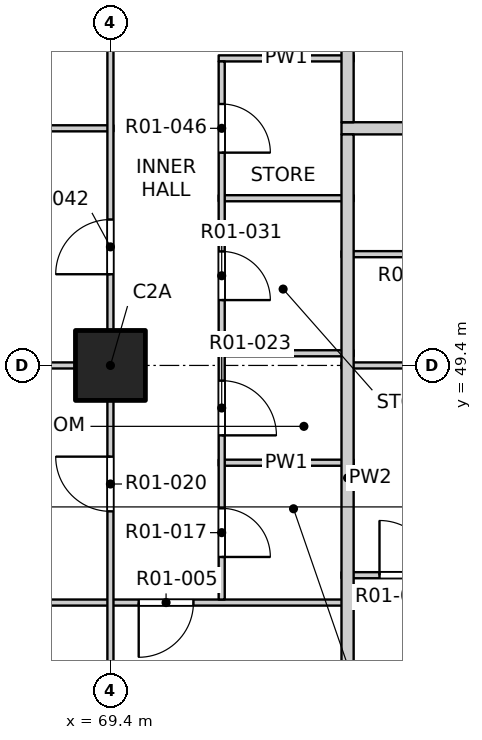
"""IFC4 building model, lengths in metres.
Left out: names, types, materials, properties, quantities, classifications, styles, units other than length and angle.
Written with IfcOpenShell. Run it as: python <this file> out.ifc"""

import sys

from ifc_helpers import new_model, si_unit, direction, frame, frame_2d, origin, origin_2d, place, context, subcontext, project, spatial, rectangle, extrude, element, fill, save


model = new_model("IFC4")
c1 = context("Model", 3, precision=1e-05, world=origin(), true_north=direction((0.0, 1.0)))
c2 = subcontext(c1, "Body", "Model", "MODEL_VIEW")
j1 = project(units=[si_unit("LENGTHUNIT", "METRE"), si_unit("PLANEANGLEUNIT", "RADIAN")], contexts=[c1])
p1 = place(None, origin())
s1 = spatial("IfcSite", under=j1, at=p1, CompositionType="ELEMENT")
p2 = place(p1, origin())
s2 = spatial("IfcBuilding", under=s1, at=p2, CompositionType="ELEMENT")
p3 = place(p2, frame((0.0, 0.0, 19.5)))
s3 = spatial("IfcBuildingStorey", under=s2, at=p3, CompositionType="ELEMENT", Elevation=19.5)
p4 = place(p3, frame((69.4, 49.4, -0.25), z_axis=(0.0, 0.0, 1.0), x_axis=(1.0, 0.0, 0.0)))
e1 = element("IfcColumn", 1, at=p4, inside=s3, PredefinedType="COLUMN", context=c2, shape_type="SweptSolid", body=[
    extrude(rectangle(XDim=1.15, YDim=1.15, at=origin_2d()), origin(), (0.0, 0.0, 1.0), 3.4),
])
p5 = place(p3, frame((61.9, 45.5, 0.0), z_axis=(0.0, 0.0, 1.0), x_axis=(1.0, 0.0, 0.0)))
e2 = element("IfcWall", 2, at=p5, inside=s3, PredefinedType="PARTITIONING", context=c2, shape_type="SweptSolid", body=[
    extrude(rectangle(XDim=11.5, YDim=0.1, at=frame_2d((5.75, 0.0))), origin(), (0.0, 0.0, 1.0), 3.15),
])
p6 = place(p5, frame((7.965, 0.0, 0.0)))
e3 = element("IfcOpeningElement", 3, at=p6, cuts=e2, PredefinedType="OPENING", context=c2, shape_type="SweptSolid", body=[
    extrude(rectangle(XDim=0.9, YDim=2.1, at=frame_2d((0.45, 1.05))), frame((0.0, 0.06, 0.0), z_axis=(0.0, -1.0, 0.0), x_axis=(1.0, 0.0, 0.0)), (0.0, 0.0, 1.0), 0.12),
])
p7 = place(p3, frame((73.2, 45.95, 0.0), z_axis=(0.0, 0.0, 1.0), x_axis=(1.0, 0.0, 0.0)))
e4 = element("IfcWall", 4, at=p7, inside=s3, PredefinedType="PARTITIONING", context=c2, shape_type="SweptSolid", body=[
    extrude(rectangle(XDim=15.8, YDim=0.1, at=frame_2d((7.9, 0.0))), origin(), (0.0, 0.0, 1.0), 3.15),
])
p8 = place(p7, frame((0.625, 0.0, 0.0)))
e5 = element("IfcOpeningElement", 5, at=p8, cuts=e4, PredefinedType="OPENING", context=c2, shape_type="SweptSolid", body=[
    extrude(rectangle(XDim=0.9, YDim=2.1, at=frame_2d((0.45, 1.05))), frame((0.0, 0.06, 0.0), z_axis=(0.0, -1.0, 0.0), x_axis=(1.0, 0.0, 0.0)), (0.0, 0.0, 1.0), 0.12),
])
p9 = place(p7, frame((2.575, 0.0, 0.0)))
e6 = element("IfcOpeningElement", 6, at=p9, cuts=e4, PredefinedType="OPENING", context=c2, shape_type="SweptSolid", body=[
    extrude(rectangle(XDim=0.9, YDim=2.1, at=frame_2d((0.45, 1.05))), frame((0.0, 0.06, 0.0), z_axis=(0.0, -1.0, 0.0), x_axis=(1.0, 0.0, 0.0)), (0.0, 0.0, 1.0), 0.12),
])
p10 = place(p7, frame((5.35, 0.0, 0.0)))
e7 = element("IfcOpeningElement", 7, at=p10, cuts=e4, PredefinedType="OPENING", context=c2, shape_type="SweptSolid", body=[
    extrude(rectangle(XDim=1.2, YDim=2.1, at=frame_2d((0.6, 1.05))), frame((0.0, 0.06, 0.0), z_axis=(0.0, -1.0, 0.0), x_axis=(1.0, 0.0, 0.0)), (0.0, 0.0, 1.0), 0.12),
])
p11 = place(p7, frame((9.25, 0.0, 0.0)))
e8 = element("IfcOpeningElement", 8, at=p11, cuts=e4, PredefinedType="OPENING", context=c2, shape_type="SweptSolid", body=[
    extrude(rectangle(XDim=1.2, YDim=2.1, at=frame_2d((0.6, 1.05))), frame((0.0, 0.06, 0.0), z_axis=(0.0, -1.0, 0.0), x_axis=(1.0, 0.0, 0.0)), (0.0, 0.0, 1.0), 0.12),
])
p12 = place(p7, frame((12.325, 0.0, 0.0)))
e9 = element("IfcOpeningElement", 9, at=p12, cuts=e4, PredefinedType="OPENING", context=c2, shape_type="SweptSolid", body=[
    extrude(rectangle(XDim=0.9, YDim=2.1, at=frame_2d((0.45, 1.05))), frame((0.0, 0.06, 0.0), z_axis=(0.0, -1.0, 0.0), x_axis=(1.0, 0.0, 0.0)), (0.0, 0.0, 1.0), 0.12),
])
p13 = place(p7, frame((14.275, 0.0, 0.0)))
e10 = element("IfcOpeningElement", 10, at=p13, cuts=e4, PredefinedType="OPENING", context=c2, shape_type="SweptSolid", body=[
    extrude(rectangle(XDim=0.9, YDim=2.1, at=frame_2d((0.45, 1.05))), frame((0.0, 0.06, 0.0), z_axis=(0.0, -1.0, 0.0), x_axis=(1.0, 0.0, 0.0)), (0.0, 0.0, 1.0), 0.12),
])
p14 = place(p3, frame((71.18, 47.8, 0.0), z_axis=(0.0, 0.0, 1.0), x_axis=(1.0, 0.0, 0.0)))
e11 = element("IfcWall", 11, at=p14, inside=s3, PredefinedType="PARTITIONING", context=c2, shape_type="SweptSolid", body=[
    extrude(rectangle(XDim=2.22, YDim=0.1, at=frame_2d((1.11, 0.0))), origin(), (0.0, 0.0, 1.0), 3.15),
])
p15 = place(p3, frame((61.9, 49.4, 0.0), z_axis=(0.0, 0.0, 1.0), x_axis=(1.0, 0.0, 0.0)))
e12 = element("IfcWall", 12, at=p15, inside=s3, PredefinedType="PARTITIONING", context=c2, shape_type="SweptSolid", body=[
    extrude(rectangle(XDim=7.55, YDim=0.1, at=frame_2d((3.775, 0.0))), origin(), (0.0, 0.0, 1.0), 2.55),
])
p16 = place(p3, frame((73.2, 49.4, 0.0), z_axis=(0.0, 0.0, 1.0), x_axis=(1.0, 0.0, 0.0)))
e13 = element("IfcWall", 13, at=p16, inside=s3, PredefinedType="PARTITIONING", context=c2, shape_type="SweptSolid", body=[
    extrude(rectangle(XDim=23.6, YDim=0.1, at=frame_2d((11.8, 0.0))), origin(), (0.0, 0.0, 1.0), 3.15),
])
p17 = place(p16, frame((2.425, 0.0, 0.0)))
e14 = element("IfcOpeningElement", 14, at=p17, cuts=e13, PredefinedType="OPENING", context=c2, shape_type="SweptSolid", body=[
    extrude(rectangle(XDim=0.9, YDim=2.1, at=frame_2d((0.45, 1.05))), frame((0.0, 0.06, 0.0), z_axis=(0.0, -1.0, 0.0), x_axis=(1.0, 0.0, 0.0)), (0.0, 0.0, 1.0), 0.12),
])
p18 = place(p16, frame((5.5, 0.0, 0.0)))
e15 = element("IfcOpeningElement", 15, at=p18, cuts=e13, PredefinedType="OPENING", context=c2, shape_type="SweptSolid", body=[
    extrude(rectangle(XDim=0.9, YDim=2.1, at=frame_2d((0.45, 1.05))), frame((0.0, 0.06, 0.0), z_axis=(0.0, -1.0, 0.0), x_axis=(1.0, 0.0, 0.0)), (0.0, 0.0, 1.0), 0.12),
])
p19 = place(p16, frame((9.4, 0.0, 0.0)))
e16 = element("IfcOpeningElement", 16, at=p19, cuts=e13, PredefinedType="OPENING", context=c2, shape_type="SweptSolid", body=[
    extrude(rectangle(XDim=0.9, YDim=2.1, at=frame_2d((0.45, 1.05))), frame((0.0, 0.06, 0.0), z_axis=(0.0, -1.0, 0.0), x_axis=(1.0, 0.0, 0.0)), (0.0, 0.0, 1.0), 0.12),
])
p20 = place(p16, frame((14.275, 0.0, 0.0)))
e17 = element("IfcOpeningElement", 17, at=p20, cuts=e13, PredefinedType="OPENING", context=c2, shape_type="SweptSolid", body=[
    extrude(rectangle(XDim=0.9, YDim=2.1, at=frame_2d((0.45, 1.05))), frame((0.0, 0.06, 0.0), z_axis=(0.0, -1.0, 0.0), x_axis=(1.0, 0.0, 0.0)), (0.0, 0.0, 1.0), 0.12),
])
p21 = place(p16, frame((17.2, 0.0, 0.0)))
e18 = element("IfcOpeningElement", 18, at=p21, cuts=e13, PredefinedType="OPENING", context=c2, shape_type="SweptSolid", body=[
    extrude(rectangle(XDim=0.9, YDim=2.1, at=frame_2d((0.45, 1.05))), frame((0.0, 0.06, 0.0), z_axis=(0.0, -1.0, 0.0), x_axis=(1.0, 0.0, 0.0)), (0.0, 0.0, 1.0), 0.12),
])
p22 = place(p16, frame((22.075, 0.0, 0.0)))
e19 = element("IfcOpeningElement", 19, at=p22, cuts=e13, PredefinedType="OPENING", context=c2, shape_type="SweptSolid", body=[
    extrude(rectangle(XDim=0.9, YDim=2.1, at=frame_2d((0.45, 1.05))), frame((0.0, 0.06, 0.0), z_axis=(0.0, -1.0, 0.0), x_axis=(1.0, 0.0, 0.0)), (0.0, 0.0, 1.0), 0.12),
])
p23 = place(p3, frame((71.18, 49.6, 0.0), z_axis=(0.0, 0.0, 1.0), x_axis=(1.0, 0.0, 0.0)))
e20 = element("IfcWall", 20, at=p23, inside=s3, PredefinedType="PARTITIONING", context=c2, shape_type="SweptSolid", body=[
    extrude(rectangle(XDim=2.22, YDim=0.1, at=frame_2d((1.11, 0.0))), origin(), (0.0, 0.0, 1.0), 3.15),
])
p24 = place(p3, frame((73.2, 51.23, 0.0), z_axis=(0.0, 0.0, 1.0), x_axis=(1.0, 0.0, 0.0)))
e21 = element("IfcWall", 21, at=p24, inside=s3, PredefinedType="PARTITIONING", context=c2, shape_type="SweptSolid", body=[
    extrude(rectangle(XDim=5.3, YDim=0.1, at=frame_2d((2.65, 0.0))), origin(), (0.0, 0.0, 1.0), 3.15),
])
p25 = place(p24, frame((1.05, 0.0, 0.0)))
e22 = element("IfcOpeningElement", 22, at=p25, cuts=e21, PredefinedType="OPENING", context=c2, shape_type="SweptSolid", body=[
    extrude(rectangle(XDim=0.8, YDim=2.1, at=frame_2d((0.4, 1.05))), frame((0.0, 0.06, 0.0), z_axis=(0.0, -1.0, 0.0), x_axis=(1.0, 0.0, 0.0)), (0.0, 0.0, 1.0), 0.12),
])
p26 = place(p24, frame((3.625, 0.0, 0.0)))
e23 = element("IfcOpeningElement", 23, at=p26, cuts=e21, PredefinedType="OPENING", context=c2, shape_type="SweptSolid", body=[
    extrude(rectangle(XDim=0.8, YDim=2.1, at=frame_2d((0.4, 1.05))), frame((0.0, 0.06, 0.0), z_axis=(0.0, -1.0, 0.0), x_axis=(1.0, 0.0, 0.0)), (0.0, 0.0, 1.0), 0.12),
])
p27 = place(p3, frame((71.18, 52.15, 0.0), z_axis=(0.0, 0.0, 1.0), x_axis=(1.0, 0.0, 0.0)))
e24 = element("IfcWall", 24, at=p27, inside=s3, PredefinedType="PARTITIONING", context=c2, shape_type="SweptSolid", body=[
    extrude(rectangle(XDim=2.22, YDim=0.1, at=frame_2d((1.11, 0.0))), origin(), (0.0, 0.0, 1.0), 3.15),
])
p28 = place(p3, frame((61.9, 53.3, 0.0), z_axis=(0.0, 0.0, 1.0), x_axis=(1.0, 0.0, 0.0)))
e25 = element("IfcWall", 25, at=p28, inside=s3, PredefinedType="PARTITIONING", context=c2, shape_type="SweptSolid", body=[
    extrude(rectangle(XDim=7.55, YDim=0.1, at=frame_2d((3.775, 0.0))), origin(), (0.0, 0.0, 1.0), 3.15),
])
p29 = place(p3, frame((73.2, 53.3, 0.0), z_axis=(0.0, 0.0, 1.0), x_axis=(1.0, 0.0, 0.0)))
e26 = element("IfcWall", 26, at=p29, inside=s3, PredefinedType="PARTITIONING", context=c2, shape_type="SweptSolid", body=[
    extrude(rectangle(XDim=23.6, YDim=0.2, at=frame_2d((11.8, 0.0))), origin(), (0.0, 0.0, 1.0), 3.15),
])
p30 = place(p29, frame((6.525, 0.0, 0.0)))
e27 = element("IfcOpeningElement", 27, at=p30, cuts=e26, PredefinedType="OPENING", context=c2, shape_type="SweptSolid", body=[
    extrude(rectangle(XDim=1.0, YDim=2.1, at=frame_2d((0.5, 1.05))), frame((0.0, 0.11, 0.0), z_axis=(0.0, -1.0, 0.0), x_axis=(1.0, 0.0, 0.0)), (0.0, 0.0, 1.0), 0.22),
])
p31 = place(p29, frame((18.275, 0.0, 0.0)))
e28 = element("IfcOpeningElement", 28, at=p31, cuts=e26, PredefinedType="OPENING", context=c2, shape_type="SweptSolid", body=[
    extrude(rectangle(XDim=1.0, YDim=2.1, at=frame_2d((0.5, 1.05))), frame((0.0, 0.11, 0.0), z_axis=(0.0, -1.0, 0.0), x_axis=(1.0, 0.0, 0.0)), (0.0, 0.0, 1.0), 0.22),
])
p32 = place(p3, frame((71.18, 54.45, 0.0), z_axis=(0.0, 0.0, 1.0), x_axis=(1.0, 0.0, 0.0)))
e29 = element("IfcWall", 29, at=p32, inside=s3, PredefinedType="PARTITIONING", context=c2, shape_type="SweptSolid", body=[
    extrude(rectangle(XDim=2.22, YDim=0.1, at=frame_2d((1.11, 0.0))), origin(), (0.0, 0.0, 1.0), 3.15),
])
p33 = place(p3, frame((69.4, 41.9, 0.0), z_axis=(0.0, 0.0, 1.0), x_axis=(0.0, 1.0, 0.0)))
e30 = element("IfcWall", 30, at=p33, inside=s3, PredefinedType="PARTITIONING", context=c2, shape_type="SweptSolid", body=[
    extrude(rectangle(XDim=7.5, YDim=0.1, at=frame_2d((3.75, 0.0))), origin(), (0.0, 0.0, 1.0), 2.55),
])
p34 = place(p33, frame((1.2, 0.0, 0.0)))
e31 = element("IfcOpeningElement", 31, at=p34, cuts=e30, PredefinedType="OPENING", context=c2, shape_type="SweptSolid", body=[
    extrude(rectangle(XDim=0.9, YDim=2.1, at=frame_2d((0.45, 1.05))), frame((0.0, 0.06, 0.0), z_axis=(0.0, -1.0, 0.0), x_axis=(1.0, 0.0, 0.0)), (0.0, 0.0, 1.0), 0.12),
])
p35 = place(p33, frame((5.1, 0.0, 0.0)))
e32 = element("IfcOpeningElement", 32, at=p35, cuts=e30, PredefinedType="OPENING", context=c2, shape_type="SweptSolid", body=[
    extrude(rectangle(XDim=0.9, YDim=2.1, at=frame_2d((0.45, 1.05))), frame((0.0, 0.06, 0.0), z_axis=(0.0, -1.0, 0.0), x_axis=(1.0, 0.0, 0.0)), (0.0, 0.0, 1.0), 0.12),
])
p36 = place(p3, frame((69.4, 49.4, 0.0), z_axis=(0.0, 0.0, 1.0), x_axis=(0.0, 1.0, 0.0)))
e33 = element("IfcWall", 33, at=p36, inside=s3, PredefinedType="PARTITIONING", context=c2, shape_type="SweptSolid", body=[
    extrude(rectangle(XDim=31.2, YDim=0.1, at=frame_2d((15.6, 0.0))), origin(), (0.0, 0.0, 1.0), 3.15),
])
p37 = place(p36, frame((1.5, 0.0, 0.0)))
e34 = element("IfcOpeningElement", 34, at=p37, cuts=e33, PredefinedType="OPENING", context=c2, shape_type="SweptSolid", body=[
    extrude(rectangle(XDim=0.9, YDim=2.1, at=frame_2d((0.45, 1.05))), frame((0.0, 0.06, 0.0), z_axis=(0.0, -1.0, 0.0), x_axis=(1.0, 0.0, 0.0)), (0.0, 0.0, 1.0), 0.12),
])
p38 = place(p36, frame((6.225, 0.0, 0.0)))
e35 = element("IfcOpeningElement", 35, at=p38, cuts=e33, PredefinedType="OPENING", context=c2, shape_type="SweptSolid", body=[
    extrude(rectangle(XDim=0.9, YDim=2.1, at=frame_2d((0.45, 1.05))), frame((0.0, 0.06, 0.0), z_axis=(0.0, -1.0, 0.0), x_axis=(1.0, 0.0, 0.0)), (0.0, 0.0, 1.0), 0.12),
])
p39 = place(p36, frame((10.275, 0.0, 0.0)))
e36 = element("IfcOpeningElement", 36, at=p39, cuts=e33, PredefinedType="OPENING", context=c2, shape_type="SweptSolid", body=[
    extrude(rectangle(XDim=0.9, YDim=2.1, at=frame_2d((0.45, 1.05))), frame((0.0, 0.06, 0.0), z_axis=(0.0, -1.0, 0.0), x_axis=(1.0, 0.0, 0.0)), (0.0, 0.0, 1.0), 0.12),
])
p40 = place(p36, frame((13.2, 0.0, 0.0)))
e37 = element("IfcOpeningElement", 37, at=p40, cuts=e33, PredefinedType="OPENING", context=c2, shape_type="SweptSolid", body=[
    extrude(rectangle(XDim=0.9, YDim=2.1, at=frame_2d((0.45, 1.05))), frame((0.0, 0.06, 0.0), z_axis=(0.0, -1.0, 0.0), x_axis=(1.0, 0.0, 0.0)), (0.0, 0.0, 1.0), 0.12),
])
p41 = place(p36, frame((18.075, 0.0, 0.0)))
e38 = element("IfcOpeningElement", 38, at=p41, cuts=e33, PredefinedType="OPENING", context=c2, shape_type="SweptSolid", body=[
    extrude(rectangle(XDim=0.9, YDim=2.1, at=frame_2d((0.45, 1.05))), frame((0.0, 0.06, 0.0), z_axis=(0.0, -1.0, 0.0), x_axis=(1.0, 0.0, 0.0)), (0.0, 0.0, 1.0), 0.12),
])
p42 = place(p36, frame((21.8, 0.0, 0.0)))
e39 = element("IfcOpeningElement", 39, at=p42, cuts=e33, PredefinedType="OPENING", context=c2, shape_type="SweptSolid", body=[
    extrude(rectangle(XDim=0.9, YDim=2.1, at=frame_2d((0.45, 1.05))), frame((0.0, 0.06, 0.0), z_axis=(0.0, -1.0, 0.0), x_axis=(1.0, 0.0, 0.0)), (0.0, 0.0, 1.0), 0.12),
])
p43 = place(p36, frame((24.9, 0.0, 0.0)))
e40 = element("IfcOpeningElement", 40, at=p43, cuts=e33, PredefinedType="OPENING", context=c2, shape_type="SweptSolid", body=[
    extrude(rectangle(XDim=0.9, YDim=2.1, at=frame_2d((0.45, 1.05))), frame((0.0, 0.06, 0.0), z_axis=(0.0, -1.0, 0.0), x_axis=(1.0, 0.0, 0.0)), (0.0, 0.0, 1.0), 0.12),
])
p44 = place(p36, frame((29.6, 0.0, 0.0)))
e41 = element("IfcOpeningElement", 41, at=p44, cuts=e33, PredefinedType="OPENING", context=c2, shape_type="SweptSolid", body=[
    extrude(rectangle(XDim=0.9, YDim=2.1, at=frame_2d((0.45, 1.05))), frame((0.0, 0.06, 0.0), z_axis=(0.0, -1.0, 0.0), x_axis=(1.0, 0.0, 0.0)), (0.0, 0.0, 1.0), 0.12),
])
p45 = place(p3, frame((71.23, 45.55, 0.0), z_axis=(0.0, 0.0, 1.0), x_axis=(0.0, 1.0, 0.0)))
e42 = element("IfcWall", 42, at=p45, inside=s3, PredefinedType="PARTITIONING", context=c2, shape_type="SweptSolid", body=[
    extrude(rectangle(XDim=8.85, YDim=0.1, at=frame_2d((4.425, 0.0))), origin(), (0.0, 0.0, 1.0), 3.15),
])
p46 = place(p45, frame((0.7, 0.0, 0.0)))
e43 = element("IfcOpeningElement", 43, at=p46, cuts=e42, PredefinedType="OPENING", context=c2, shape_type="SweptSolid", body=[
    extrude(rectangle(XDim=0.8, YDim=2.1, at=frame_2d((0.4, 1.05))), frame((0.0, 0.06, 0.0), z_axis=(0.0, -1.0, 0.0), x_axis=(1.0, 0.0, 0.0)), (0.0, 0.0, 1.0), 0.12),
])
p47 = place(p45, frame((2.7, 0.0, 0.0)))
e44 = element("IfcOpeningElement", 44, at=p47, cuts=e42, PredefinedType="OPENING", context=c2, shape_type="SweptSolid", body=[
    extrude(rectangle(XDim=0.9, YDim=2.1, at=frame_2d((0.45, 1.05))), frame((0.0, 0.06, 0.0), z_axis=(0.0, -1.0, 0.0), x_axis=(1.0, 0.0, 0.0)), (0.0, 0.0, 1.0), 0.12),
])
p48 = place(p45, frame((4.925, 0.0, 0.0)))
e45 = element("IfcOpeningElement", 45, at=p48, cuts=e42, PredefinedType="OPENING", context=c2, shape_type="SweptSolid", body=[
    extrude(rectangle(XDim=0.8, YDim=2.1, at=frame_2d((0.4, 1.05))), frame((0.0, 0.06, 0.0), z_axis=(0.0, -1.0, 0.0), x_axis=(1.0, 0.0, 0.0)), (0.0, 0.0, 1.0), 0.12),
])
p49 = place(p45, frame((7.35, 0.0, 0.0)))
e46 = element("IfcOpeningElement", 46, at=p49, cuts=e42, PredefinedType="OPENING", context=c2, shape_type="SweptSolid", body=[
    extrude(rectangle(XDim=0.8, YDim=2.1, at=frame_2d((0.4, 1.05))), frame((0.0, 0.06, 0.0), z_axis=(0.0, -1.0, 0.0), x_axis=(1.0, 0.0, 0.0)), (0.0, 0.0, 1.0), 0.12),
])
p50 = place(p3, frame((73.3, 41.9, 0.0), z_axis=(0.0, 0.0, 1.0), x_axis=(0.0, 1.0, 0.0)))
e47 = element("IfcWall", 47, at=p50, inside=s3, PredefinedType="PARTITIONING", context=c2, shape_type="SweptSolid", body=[
    extrude(rectangle(XDim=11.3, YDim=0.2, at=frame_2d((5.65, 0.0))), origin(), (0.0, 0.0, 1.0), 3.15),
])
p51 = place(p3, frame((73.3, 53.4, 0.0), z_axis=(0.0, 0.0, 1.0), x_axis=(0.0, 1.0, 0.0)))
e48 = element("IfcWall", 48, at=p51, inside=s3, PredefinedType="PARTITIONING", context=c2, shape_type="SweptSolid", body=[
    extrude(rectangle(XDim=31.0, YDim=0.2, at=frame_2d((15.5, 0.0))), origin(), (0.0, 0.0, 1.0), 3.15),
])
p52 = place(p51, frame((2.325, 0.0, 0.0)))
e49 = element("IfcOpeningElement", 49, at=p52, cuts=e48, PredefinedType="OPENING", context=c2, shape_type="SweptSolid", body=[
    extrude(rectangle(XDim=1.0, YDim=2.1, at=frame_2d((0.5, 1.05))), frame((0.0, 0.11, 0.0), z_axis=(0.0, -1.0, 0.0), x_axis=(1.0, 0.0, 0.0)), (0.0, 0.0, 1.0), 0.22),
])
p53 = place(p51, frame((10.725, 0.0, 0.0)))
e50 = element("IfcOpeningElement", 50, at=p53, cuts=e48, PredefinedType="OPENING", context=c2, shape_type="SweptSolid", body=[
    extrude(rectangle(XDim=1.0, YDim=2.1, at=frame_2d((0.5, 1.05))), frame((0.0, 0.11, 0.0), z_axis=(0.0, -1.0, 0.0), x_axis=(1.0, 0.0, 0.0)), (0.0, 0.0, 1.0), 0.22),
])
p54 = place(p51, frame((18.225, 0.0, 0.0)))
e51 = element("IfcOpeningElement", 51, at=p54, cuts=e48, PredefinedType="OPENING", context=c2, shape_type="SweptSolid", body=[
    extrude(rectangle(XDim=1.0, YDim=2.1, at=frame_2d((0.5, 1.05))), frame((0.0, 0.11, 0.0), z_axis=(0.0, -1.0, 0.0), x_axis=(1.0, 0.0, 0.0)), (0.0, 0.0, 1.0), 0.22),
])
p55 = place(p51, frame((25.925, 0.0, 0.0)))
e52 = element("IfcOpeningElement", 52, at=p55, cuts=e48, PredefinedType="OPENING", context=c2, shape_type="SweptSolid", body=[
    extrude(rectangle(XDim=1.0, YDim=2.1, at=frame_2d((0.5, 1.05))), frame((0.0, 0.11, 0.0), z_axis=(0.0, -1.0, 0.0), x_axis=(1.0, 0.0, 0.0)), (0.0, 0.0, 1.0), 0.22),
])
p56 = place(p6, origin())
e53 = element("IfcDoor", 53, at=p56, inside=s3, OperationType="SINGLE_SWING_RIGHT", PredefinedType="DOOR", context=c2, shape_type="SweptSolid", body=[
    extrude(rectangle(XDim=0.9, YDim=2.1, at=frame_2d((0.45, 1.05))), frame((0.0, 0.025, 0.0), z_axis=(0.0, -1.0, 0.0), x_axis=(1.0, 0.0, 0.0)), (0.0, 0.0, 1.0), 0.05),
])
fill(e3, e53)
p57 = place(p8, origin())
e54 = element("IfcDoor", 54, at=p57, inside=s3, OperationType="SINGLE_SWING_LEFT", PredefinedType="DOOR", context=c2, shape_type="SweptSolid", body=[
    extrude(rectangle(XDim=0.9, YDim=2.1, at=frame_2d((0.45, 1.05))), frame((0.0, 0.025, 0.0), z_axis=(0.0, -1.0, 0.0), x_axis=(1.0, 0.0, 0.0)), (0.0, 0.0, 1.0), 0.05),
])
fill(e5, e54)
p58 = place(p46, origin())
e55 = element("IfcDoor", 55, at=p58, inside=s3, OperationType="SINGLE_SWING_RIGHT", PredefinedType="DOOR", context=c2, shape_type="SweptSolid", body=[
    extrude(rectangle(XDim=0.8, YDim=2.1, at=frame_2d((0.4, 1.05))), frame((0.0, 0.025, 0.0), z_axis=(0.0, -1.0, 0.0), x_axis=(1.0, 0.0, 0.0)), (0.0, 0.0, 1.0), 0.05),
])
fill(e43, e55)
p59 = place(p35, origin())
e56 = element("IfcDoor", 56, at=p59, inside=s3, OperationType="SINGLE_SWING_RIGHT", PredefinedType="DOOR", context=c2, shape_type="SweptSolid", body=[
    extrude(rectangle(XDim=0.9, YDim=2.1, at=frame_2d((0.45, 1.05))), frame((0.0, 0.025, 0.0), z_axis=(0.0, -1.0, 0.0), x_axis=(1.0, 0.0, 0.0)), (0.0, 0.0, 1.0), 0.05),
])
fill(e32, e56)
p60 = place(p47, origin())
e57 = element("IfcDoor", 57, at=p60, inside=s3, OperationType="SINGLE_SWING_RIGHT", PredefinedType="DOOR", context=c2, shape_type="SweptSolid", body=[
    extrude(rectangle(XDim=0.9, YDim=2.1, at=frame_2d((0.45, 1.05))), frame((0.0, 0.025, 0.0), z_axis=(0.0, -1.0, 0.0), x_axis=(1.0, 0.0, 0.0)), (0.0, 0.0, 1.0), 0.05),
])
fill(e44, e57)
p61 = place(p48, origin())
e58 = element("IfcDoor", 58, at=p61, inside=s3, OperationType="SINGLE_SWING_RIGHT", PredefinedType="DOOR", context=c2, shape_type="SweptSolid", body=[
    extrude(rectangle(XDim=0.8, YDim=2.1, at=frame_2d((0.4, 1.05))), frame((0.0, 0.025, 0.0), z_axis=(0.0, -1.0, 0.0), x_axis=(1.0, 0.0, 0.0)), (0.0, 0.0, 1.0), 0.05),
])
fill(e45, e58)
p62 = place(p37, origin())
e59 = element("IfcDoor", 59, at=p62, inside=s3, OperationType="SINGLE_SWING_LEFT", PredefinedType="DOOR", context=c2, shape_type="SweptSolid", body=[
    extrude(rectangle(XDim=0.9, YDim=2.1, at=frame_2d((0.45, 1.05))), frame((0.0, 0.025, 0.0), z_axis=(0.0, -1.0, 0.0), x_axis=(1.0, 0.0, 0.0)), (0.0, 0.0, 1.0), 0.05),
])
fill(e34, e59)
p63 = place(p49, origin())
e60 = element("IfcDoor", 60, at=p63, inside=s3, OperationType="SINGLE_SWING_RIGHT", PredefinedType="DOOR", context=c2, shape_type="SweptSolid", body=[
    extrude(rectangle(XDim=0.8, YDim=2.1, at=frame_2d((0.4, 1.05))), frame((0.0, 0.025, 0.0), z_axis=(0.0, -1.0, 0.0), x_axis=(1.0, 0.0, 0.0)), (0.0, 0.0, 1.0), 0.05),
])
fill(e46, e60)
save(model, sys.argv[1])
